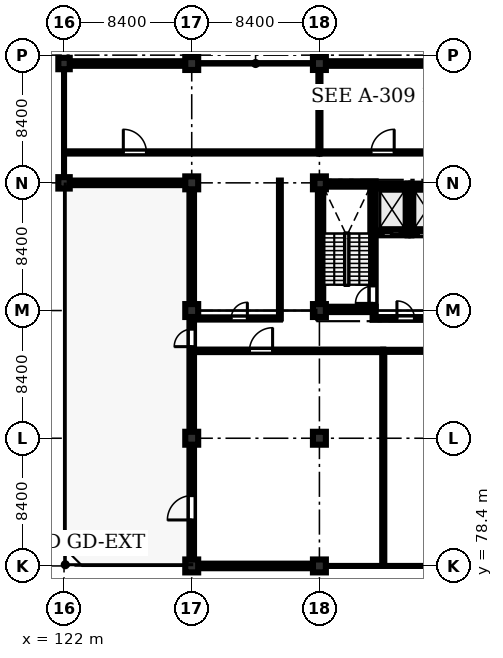
"""IFC4 building model, lengths in metres.
Left out: names, types, materials, properties, quantities, classifications, styles, units other than length and angle.
Written with IfcOpenShell. Run it as: python <this file> out.ifc"""

import sys

from ifc_helpers import new_model, si_unit, direction, frame, frame_2d, origin, origin_2d, place, context, subcontext, project, spatial, rectangle, extrude, element, fill, save


model = new_model("IFC4")
c1 = context("Model", 3, precision=1e-05, world=origin(), true_north=direction((0.0, 1.0)))
c2 = subcontext(c1, "Body", "Model", "MODEL_VIEW")
j1 = project(units=[si_unit("LENGTHUNIT", "METRE"), si_unit("PLANEANGLEUNIT", "RADIAN")], contexts=[c1])
p1 = place(None, origin())
s1 = spatial("IfcSite", under=j1, at=p1, CompositionType="ELEMENT")
p2 = place(p1, origin())
s2 = spatial("IfcBuilding", under=s1, at=p2, CompositionType="ELEMENT")
p3 = place(p2, frame((0.0, 0.0, 27.6)))
s3 = spatial("IfcBuildingStorey", under=s2, at=p3, CompositionType="ELEMENT", Elevation=27.6)
for number, where, z_axis, x_axis in (
    (1, (122.0, 103.6, 0.0), (0.0, 0.0, 1.0), (1.0, 0.0, 0.0)),
    (2, (122.0, 111.45, 0.0), (0.0, 0.0, 1.0), (1.0, 0.0, 0.0)),
):
    element("IfcColumn", number, at=place(p3, frame(where, z_axis=z_axis, x_axis=x_axis)), inside=s3, PredefinedType="COLUMN", context=c2, shape_type="SweptSolid", body=[
        extrude(rectangle(XDim=0.75, YDim=0.75, at=origin_2d()), origin(), (0.0, 0.0, 1.0), 4.02),
    ])
for number, where, z_axis, x_axis in (
    (3, (130.4, 78.4, 0.0), (0.0, 0.0, 1.0), (1.0, 0.0, 0.0)),
    (4, (130.4, 86.8, 0.0), (0.0, 0.0, 1.0), (1.0, 0.0, 0.0)),
    (5, (130.4, 95.2, 0.0), (0.0, 0.0, 1.0), (1.0, 0.0, 0.0)),
    (6, (130.4, 103.6, 0.0), (0.0, 0.0, 1.0), (1.0, 0.0, 0.0)),
    (7, (130.4, 111.45, 0.0), (0.0, 0.0, 1.0), (1.0, 0.0, 0.0)),
    (8, (138.8, 78.4, 0.0), (0.0, 0.0, 1.0), (1.0, 0.0, 0.0)),
    (9, (138.8, 86.8, 0.0), (0.0, 0.0, 1.0), (1.0, 0.0, 0.0)),
    (10, (138.8, 95.2, 0.0), (0.0, 0.0, 1.0), (1.0, 0.0, 0.0)),
    (11, (138.8, 103.6, 0.0), (0.0, 0.0, 1.0), (1.0, 0.0, 0.0)),
    (12, (138.8, 111.45, 0.0), (0.0, 0.0, 1.0), (1.0, 0.0, 0.0)),
):
    element("IfcColumn", number, at=place(p3, frame(where, z_axis=z_axis, x_axis=x_axis)), inside=s3, PredefinedType="COLUMN", context=c2, shape_type="SweptSolid", body=[
        extrude(rectangle(XDim=0.85, YDim=0.85, at=origin_2d()), origin(), (0.0, 0.0, 1.0), 4.02),
    ])
for number, where, z_axis, x_axis in (
    (13, (138.7, 95.275, 0.0), (0.0, 0.0, 1.0), (1.0, 0.0, 0.0)),
    (14, (138.7, 103.525, 0.0), (0.0, 0.0, 1.0), (1.0, 0.0, 0.0)),
):
    element("IfcWall", number, at=place(p3, frame(where, z_axis=z_axis, x_axis=x_axis)), inside=s3, PredefinedType="SHEAR", context=c2, shape_type="SweptSolid", body=[
        extrude(rectangle(XDim=3.8, YDim=0.35, at=frame_2d((1.9, 0.0))), origin(), (0.0, 0.0, 1.0), 4.02),
    ])
p4 = place(p3, frame((138.875, 95.45, 0.0), z_axis=(0.0, 0.0, 1.0), x_axis=(0.0, 1.0, 0.0)))
e15 = element("IfcWall", 15, at=p4, inside=s3, PredefinedType="SHEAR", context=c2, shape_type="SweptSolid", body=[
    extrude(rectangle(XDim=7.9, YDim=0.35, at=frame_2d((3.95, 0.0))), origin(), (0.0, 0.0, 1.0), 4.02),
])
p5 = place(p3, frame((142.325, 95.45, 0.0), z_axis=(0.0, 0.0, 1.0), x_axis=(0.0, 1.0, 0.0)))
e16 = element("IfcWall", 16, at=p5, inside=s3, PredefinedType="SHEAR", context=c2, shape_type="SweptSolid", body=[
    extrude(rectangle(XDim=7.9, YDim=0.35, at=frame_2d((3.95, 0.0))), origin(), (0.0, 0.0, 1.0), 4.02),
])
p6 = place(p5, frame((0.22, 0.0, 0.0)))
e17 = element("IfcOpeningElement", 17, at=p6, cuts=e16, PredefinedType="OPENING", context=c2, shape_type="SweptSolid", body=[
    extrude(rectangle(XDim=1.15, YDim=2.15, at=frame_2d((0.575, 1.075))), frame((0.0, 0.185, 0.0), z_axis=(0.0, -1.0, 0.0), x_axis=(1.0, 0.0, 0.0)), (0.0, 0.0, 1.0), 0.37),
])
p7 = place(p3, frame((142.5, 100.275, 0.0), z_axis=(0.0, 0.0, 1.0), x_axis=(1.0, 0.0, 0.0)))
e18 = element("IfcWall", 18, at=p7, inside=s3, PredefinedType="SHEAR", context=c2, shape_type="SweptSolid", body=[
    extrude(rectangle(XDim=2.1, YDim=0.25, at=frame_2d((1.05, 0.0))), origin(), (0.0, 0.0, 1.0), 4.02),
])
p8 = place(p7, frame((0.5, 0.0, 0.0)))
e19 = element("IfcOpeningElement", 19, at=p8, cuts=e18, PredefinedType="OPENING", context=c2, shape_type="SweptSolid", body=[
    extrude(rectangle(XDim=1.1, YDim=2.15, at=frame_2d((0.55, 1.075))), frame((0.0, 0.135, 0.0), z_axis=(0.0, -1.0, 0.0), x_axis=(1.0, 0.0, 0.0)), (0.0, 0.0, 1.0), 0.27),
])
p9 = place(p3, frame((142.5, 103.425, 0.0), z_axis=(0.0, 0.0, 1.0), x_axis=(1.0, 0.0, 0.0)))
e20 = element("IfcWall", 20, at=p9, inside=s3, PredefinedType="SHEAR", context=c2, shape_type="SweptSolid", body=[
    extrude(rectangle(XDim=2.1, YDim=0.25, at=frame_2d((1.05, 0.0))), origin(), (0.0, 0.0, 1.0), 4.02),
])
p10 = place(p3, frame((144.725, 100.15, 0.0), z_axis=(0.0, 0.0, 1.0), x_axis=(0.0, 1.0, 0.0)))
e21 = element("IfcWall", 21, at=p10, inside=s3, PredefinedType="SHEAR", context=c2, shape_type="SweptSolid", body=[
    extrude(rectangle(XDim=3.4, YDim=0.25, at=frame_2d((1.7, 0.0))), origin(), (0.0, 0.0, 1.0), 4.02),
])
p11 = place(p3, frame((144.85, 100.275, 0.0), z_axis=(0.0, 0.0, 1.0), x_axis=(1.0, 0.0, 0.0)))
e22 = element("IfcWall", 22, at=p11, inside=s3, PredefinedType="SHEAR", context=c2, shape_type="SweptSolid", body=[
    extrude(rectangle(XDim=2.05, YDim=0.25, at=frame_2d((1.025, 0.0))), origin(), (0.0, 0.0, 1.0), 4.02),
])
p12 = place(p11, frame((0.465, 0.0, 0.0)))
e23 = element("IfcOpeningElement", 23, at=p12, cuts=e22, PredefinedType="OPENING", context=c2, shape_type="SweptSolid", body=[
    extrude(rectangle(XDim=1.12, YDim=2.15, at=frame_2d((0.56, 1.075))), frame((0.0, 0.135, 0.0), z_axis=(0.0, -1.0, 0.0), x_axis=(1.0, 0.0, 0.0)), (0.0, 0.0, 1.0), 0.27),
])
p13 = place(p3, frame((144.85, 103.425, 0.0), z_axis=(0.0, 0.0, 1.0), x_axis=(1.0, 0.0, 0.0)))
e24 = element("IfcWall", 24, at=p13, inside=s3, PredefinedType="SHEAR", context=c2, shape_type="SweptSolid", body=[
    extrude(rectangle(XDim=2.05, YDim=0.25, at=frame_2d((1.025, 0.0))), origin(), (0.0, 0.0, 1.0), 4.02),
])
p14 = place(p3, frame((122.375, 111.45, 0.0), z_axis=(0.0, 0.0, 1.0), x_axis=(1.0, 0.0, 0.0)))
e25 = element("IfcWall", 25, at=p14, inside=s3, PredefinedType="STANDARD", context=c2, shape_type="SweptSolid", body=[
    extrude(rectangle(XDim=7.6, YDim=0.3, at=frame_2d((3.8, 0.0))), origin(), (0.0, 0.0, 1.0), 3.32),
])
p15 = place(p14, frame((0.85, 0.0, 0.9)))
e26 = element("IfcOpeningElement", 26, at=p15, cuts=e25, PredefinedType="OPENING", context=c2, shape_type="SweptSolid", body=[
    extrude(rectangle(XDim=1.8, YDim=2.1, at=frame_2d((0.9, 1.05))), frame((0.0, 0.16, 0.0), z_axis=(0.0, -1.0, 0.0), x_axis=(1.0, 0.0, 0.0)), (0.0, 0.0, 1.0), 0.32),
])
p16 = place(p14, frame((4.65, 0.0, 0.9)))
e27 = element("IfcOpeningElement", 27, at=p16, cuts=e25, PredefinedType="OPENING", context=c2, shape_type="SweptSolid", body=[
    extrude(rectangle(XDim=1.8, YDim=2.1, at=frame_2d((0.9, 1.05))), frame((0.0, 0.16, 0.0), z_axis=(0.0, -1.0, 0.0), x_axis=(1.0, 0.0, 0.0)), (0.0, 0.0, 1.0), 0.32),
])
p17 = place(p3, frame((139.225, 111.45, 0.0), z_axis=(0.0, 0.0, 1.0), x_axis=(1.0, 0.0, 0.0)))
e28 = element("IfcWall", 28, at=p17, inside=s3, PredefinedType="STANDARD", context=c2, shape_type="SweptSolid", body=[
    extrude(rectangle(XDim=7.55, YDim=0.3, at=frame_2d((3.775, 0.0))), origin(), (0.0, 0.0, 1.0), 3.32),
])
p18 = place(p17, frame((0.85, 0.0, 0.9)))
e29 = element("IfcOpeningElement", 29, at=p18, cuts=e28, PredefinedType="OPENING", context=c2, shape_type="SweptSolid", body=[
    extrude(rectangle(XDim=1.8, YDim=2.1, at=frame_2d((0.9, 1.05))), frame((0.0, 0.16, 0.0), z_axis=(0.0, -1.0, 0.0), x_axis=(1.0, 0.0, 0.0)), (0.0, 0.0, 1.0), 0.32),
])
p19 = place(p17, frame((4.65, 0.0, 0.9)))
e30 = element("IfcOpeningElement", 30, at=p19, cuts=e28, PredefinedType="OPENING", context=c2, shape_type="SweptSolid", body=[
    extrude(rectangle(XDim=1.8, YDim=2.1, at=frame_2d((0.9, 1.05))), frame((0.0, 0.16, 0.0), z_axis=(0.0, -1.0, 0.0), x_axis=(1.0, 0.0, 0.0)), (0.0, 0.0, 1.0), 0.32),
])
p20 = place(p3, frame((138.375, 78.4, 0.0), z_axis=(0.0, 0.0, 1.0), x_axis=(-1.0, 0.0, 0.0)))
e31 = element("IfcWall", 31, at=p20, inside=s3, PredefinedType="STANDARD", context=c2, shape_type="SweptSolid", body=[
    extrude(rectangle(XDim=7.55, YDim=0.3, at=frame_2d((3.775, 0.0))), origin(), (0.0, 0.0, 1.0), 3.32),
])
p21 = place(p20, frame((1.15, 0.0, 0.95)))
e32 = element("IfcOpeningElement", 32, at=p21, cuts=e31, PredefinedType="OPENING", context=c2, shape_type="SweptSolid", body=[
    extrude(rectangle(XDim=1.85, YDim=2.05, at=frame_2d((0.925, 1.025))), frame((0.0, 0.16, 0.0), z_axis=(0.0, -1.0, 0.0), x_axis=(1.0, 0.0, 0.0)), (0.0, 0.0, 1.0), 0.32),
])
p22 = place(p3, frame((130.4, 78.825, 0.0), z_axis=(0.0, 0.0, 1.0), x_axis=(0.0, 1.0, 0.0)))
e33 = element("IfcWall", 33, at=p22, inside=s3, PredefinedType="STANDARD", context=c2, shape_type="SweptSolid", body=[
    extrude(rectangle(XDim=7.55, YDim=0.3, at=frame_2d((3.775, 0.0))), origin(), (0.0, 0.0, 1.0), 3.32),
])
p23 = place(p22, frame((2.6, 0.0, 0.0)))
e34 = element("IfcOpeningElement", 34, at=p23, cuts=e33, PredefinedType="OPENING", context=c2, shape_type="SweptSolid", body=[
    extrude(rectangle(XDim=1.6, YDim=2.25, at=frame_2d((0.8, 1.125))), frame((0.0, 0.16, 0.0), z_axis=(0.0, -1.0, 0.0), x_axis=(1.0, 0.0, 0.0)), (0.0, 0.0, 1.0), 0.32),
])
p24 = place(p3, frame((130.4, 87.225, 0.0), z_axis=(0.0, 0.0, 1.0), x_axis=(0.0, 1.0, 0.0)))
e35 = element("IfcWall", 35, at=p24, inside=s3, PredefinedType="STANDARD", context=c2, shape_type="SweptSolid", body=[
    extrude(rectangle(XDim=7.55, YDim=0.3, at=frame_2d((3.775, 0.0))), origin(), (0.0, 0.0, 1.0), 3.32),
])
p25 = place(p24, frame((5.6, 0.0, 0.0)))
e36 = element("IfcOpeningElement", 36, at=p25, cuts=e35, PredefinedType="OPENING", context=c2, shape_type="SweptSolid", body=[
    extrude(rectangle(XDim=1.15, YDim=2.25, at=frame_2d((0.575, 1.125))), frame((0.0, 0.16, 0.0), z_axis=(0.0, -1.0, 0.0), x_axis=(1.0, 0.0, 0.0)), (0.0, 0.0, 1.0), 0.32),
])
p26 = place(p3, frame((130.4, 95.625, 0.0), z_axis=(0.0, 0.0, 1.0), x_axis=(0.0, 1.0, 0.0)))
e37 = element("IfcWall", 37, at=p26, inside=s3, PredefinedType="STANDARD", context=c2, shape_type="SweptSolid", body=[
    extrude(rectangle(XDim=7.55, YDim=0.3, at=frame_2d((3.775, 0.0))), origin(), (0.0, 0.0, 1.0), 3.32),
])
p27 = place(p26, frame((2.4, 0.0, 1.0)))
e38 = element("IfcOpeningElement", 38, at=p27, cuts=e37, PredefinedType="OPENING", context=c2, shape_type="SweptSolid", body=[
    extrude(rectangle(XDim=1.8, YDim=1.8, at=frame_2d((0.9, 0.9))), frame((0.0, 0.16, 0.0), z_axis=(0.0, -1.0, 0.0), x_axis=(1.0, 0.0, 0.0)), (0.0, 0.0, 1.0), 0.32),
])
p28 = place(p3, frame((129.975, 103.6, 0.0), z_axis=(0.0, 0.0, 1.0), x_axis=(-1.0, 0.0, 0.0)))
e39 = element("IfcWall", 39, at=p28, inside=s3, PredefinedType="STANDARD", context=c2, shape_type="SweptSolid", body=[
    extrude(rectangle(XDim=7.6, YDim=0.3, at=frame_2d((3.8, 0.0))), origin(), (0.0, 0.0, 1.0), 3.32),
])
p29 = place(p3, frame((142.3, 94.68, 0.0), z_axis=(0.0, 0.0, 1.0), x_axis=(1.0, 0.0, 0.0)))
e40 = element("IfcWall", 40, at=p29, inside=s3, PredefinedType="STANDARD", context=c2, shape_type="SweptSolid", body=[
    extrude(rectangle(XDim=4.8, YDim=0.18, at=frame_2d((2.4, 0.0))), origin(), (0.0, 0.0, 1.0), 4.02),
])
p30 = place(p29, frame((1.6, 0.0, 0.0)))
e41 = element("IfcOpeningElement", 41, at=p30, cuts=e40, PredefinedType="OPENING", context=c2, shape_type="SweptSolid", body=[
    extrude(rectangle(XDim=1.15, YDim=2.15, at=frame_2d((0.575, 1.075))), frame((0.0, 0.1, 0.0), z_axis=(0.0, -1.0, 0.0), x_axis=(1.0, 0.0, 0.0)), (0.0, 0.0, 1.0), 0.2),
])
p31 = place(p3, frame((136.2, 94.68, 0.0), z_axis=(0.0, 0.0, 1.0), x_axis=(0.0, 1.0, 0.0)))
e42 = element("IfcWall", 42, at=p31, inside=s3, PredefinedType="PARTITIONING", context=c2, shape_type="SweptSolid", body=[
    extrude(rectangle(XDim=9.07, YDim=0.12, at=frame_2d((4.535, 0.0))), origin(), (0.0, 0.0, 1.0), 4.02),
])
p32 = place(p3, frame((130.8, 94.68, 0.0), z_axis=(0.0, 0.0, 1.0), x_axis=(1.0, 0.0, 0.0)))
e43 = element("IfcWall", 43, at=p32, inside=s3, PredefinedType="PARTITIONING", context=c2, shape_type="SweptSolid", body=[
    extrude(rectangle(XDim=5.4, YDim=0.145, at=frame_2d((2.7, 0.0))), origin(), (0.0, 0.0, 1.0), 4.02),
])
p33 = place(p32, frame((2.2, 0.0, 0.0)))
e44 = element("IfcOpeningElement", 44, at=p33, cuts=e43, PredefinedType="OPENING", context=c2, shape_type="SweptSolid", body=[
    extrude(rectangle(XDim=1.06, YDim=2.16, at=frame_2d((0.53, 1.08))), frame((0.0, 0.083, 0.0), z_axis=(0.0, -1.0, 0.0), x_axis=(1.0, 0.0, 0.0)), (0.0, 0.0, 1.0), 0.165),
])
p34 = place(p3, frame((122.15, 105.6, 0.0), z_axis=(0.0, 0.0, 1.0), x_axis=(1.0, 0.0, 0.0)))
e45 = element("IfcWall", 45, at=p34, inside=s3, PredefinedType="PARTITIONING", context=c2, shape_type="SweptSolid", body=[
    extrude(rectangle(XDim=16.65, YDim=0.145, at=frame_2d((8.325, 0.0))), origin(), (0.0, 0.0, 1.0), 4.02),
])
p35 = place(p34, frame((3.75, 0.0, 0.0)))
e46 = element("IfcOpeningElement", 46, at=p35, cuts=e45, PredefinedType="OPENING", context=c2, shape_type="SweptSolid", body=[
    extrude(rectangle(XDim=1.52, YDim=2.22, at=frame_2d((0.76, 1.11))), frame((0.0, 0.083, 0.0), z_axis=(0.0, -1.0, 0.0), x_axis=(1.0, 0.0, 0.0)), (0.0, 0.0, 1.0), 0.165),
])
p36 = place(p3, frame((138.8, 105.6, 0.0), z_axis=(0.0, 0.0, 1.0), x_axis=(1.0, 0.0, 0.0)))
e47 = element("IfcWall", 47, at=p36, inside=s3, PredefinedType="PARTITIONING", context=c2, shape_type="SweptSolid", body=[
    extrude(rectangle(XDim=16.8, YDim=0.145, at=frame_2d((8.4, 0.0))), origin(), (0.0, 0.0, 1.0), 4.02),
])
p37 = place(p36, frame((3.4, 0.0, 0.0)))
e48 = element("IfcOpeningElement", 48, at=p37, cuts=e47, PredefinedType="OPENING", context=c2, shape_type="SweptSolid", body=[
    extrude(rectangle(XDim=1.52, YDim=2.22, at=frame_2d((0.76, 1.11))), frame((0.0, 0.083, 0.0), z_axis=(0.0, -1.0, 0.0), x_axis=(1.0, 0.0, 0.0)), (0.0, 0.0, 1.0), 0.165),
])
p38 = place(p3, frame((138.8, 105.6, 0.0), z_axis=(0.0, 0.0, 1.0), x_axis=(0.0, 1.0, 0.0)))
e49 = element("IfcWall", 49, at=p38, inside=s3, PredefinedType="PARTITIONING", context=c2, shape_type="SweptSolid", body=[
    extrude(rectangle(XDim=5.75, YDim=0.135, at=frame_2d((2.875, 0.0))), origin(), (0.0, 0.0, 1.0), 3.32),
])
p39 = place(p3, frame((130.55, 92.55, 0.0), z_axis=(0.0, 0.0, 1.0), x_axis=(1.0, 0.0, 0.0)))
e50 = element("IfcWall", 50, at=p39, inside=s3, PredefinedType="PARTITIONING", context=c2, shape_type="SweptSolid", body=[
    extrude(rectangle(XDim=12.45, YDim=0.165, at=frame_2d((6.225, 0.0))), origin(), (0.0, 0.0, 1.0), 4.02),
])
p40 = place(p39, frame((3.65, 0.0, 0.0)))
e51 = element("IfcOpeningElement", 51, at=p40, cuts=e50, PredefinedType="OPENING", context=c2, shape_type="SweptSolid", body=[
    extrude(rectangle(XDim=1.52, YDim=2.22, at=frame_2d((0.76, 1.11))), frame((0.0, 0.093, 0.0), z_axis=(0.0, -1.0, 0.0), x_axis=(1.0, 0.0, 0.0)), (0.0, 0.0, 1.0), 0.185),
])
p41 = place(p3, frame((143.0, 92.55, 0.0), z_axis=(0.0, 0.0, 1.0), x_axis=(1.0, 0.0, 0.0)))
e52 = element("IfcWall", 52, at=p41, inside=s3, PredefinedType="PARTITIONING", context=c2, shape_type="SweptSolid", body=[
    extrude(rectangle(XDim=12.6, YDim=0.135, at=frame_2d((6.3, 0.0))), origin(), (0.0, 0.0, 1.0), 4.02),
])
p42 = place(p41, frame((6.8, 0.0, 0.0)))
e53 = element("IfcOpeningElement", 53, at=p42, cuts=e52, PredefinedType="OPENING", context=c2, shape_type="SweptSolid", body=[
    extrude(rectangle(XDim=1.08, YDim=2.15, at=frame_2d((0.54, 1.075))), frame((0.0, 0.077, 0.0), z_axis=(0.0, -1.0, 0.0), x_axis=(1.0, 0.0, 0.0)), (0.0, 0.0, 1.0), 0.155),
])
p43 = place(p3, frame((143.0, 78.55, 0.0), z_axis=(0.0, 0.0, 1.0), x_axis=(0.0, 1.0, 0.0)))
e54 = element("IfcWall", 54, at=p43, inside=s3, PredefinedType="PARTITIONING", context=c2, shape_type="SweptSolid", body=[
    extrude(rectangle(XDim=14.0, YDim=0.135, at=frame_2d((7.0, 0.0))), origin(), (0.0, 0.0, 1.0), 3.52),
])
p44 = place(p15, origin())
e55 = element("IfcWindow", 55, at=p44, inside=s3, PartitioningType="DOUBLE_PANEL_VERTICAL", PredefinedType="WINDOW", context=c2, shape_type="SweptSolid", body=[
    extrude(rectangle(XDim=1.8, YDim=2.1, at=frame_2d((0.9, 1.05))), frame((0.0, 0.03, 0.0), z_axis=(0.0, -1.0, 0.0), x_axis=(1.0, 0.0, 0.0)), (0.0, 0.0, 1.0), 0.06),
])
fill(e26, e55)
p45 = place(p16, origin())
e56 = element("IfcWindow", 56, at=p45, inside=s3, PartitioningType="DOUBLE_PANEL_VERTICAL", PredefinedType="WINDOW", context=c2, shape_type="SweptSolid", body=[
    extrude(rectangle(XDim=1.8, YDim=2.1, at=frame_2d((0.9, 1.05))), frame((0.0, 0.03, 0.0), z_axis=(0.0, -1.0, 0.0), x_axis=(1.0, 0.0, 0.0)), (0.0, 0.0, 1.0), 0.06),
])
fill(e27, e56)
p46 = place(p18, origin())
e57 = element("IfcWindow", 57, at=p46, inside=s3, PartitioningType="DOUBLE_PANEL_VERTICAL", PredefinedType="WINDOW", context=c2, shape_type="SweptSolid", body=[
    extrude(rectangle(XDim=1.8, YDim=2.1, at=frame_2d((0.9, 1.05))), frame((0.0, 0.03, 0.0), z_axis=(0.0, -1.0, 0.0), x_axis=(1.0, 0.0, 0.0)), (0.0, 0.0, 1.0), 0.06),
])
fill(e29, e57)
p47 = place(p19, origin())
e58 = element("IfcWindow", 58, at=p47, inside=s3, PartitioningType="DOUBLE_PANEL_VERTICAL", PredefinedType="WINDOW", context=c2, shape_type="SweptSolid", body=[
    extrude(rectangle(XDim=1.8, YDim=2.1, at=frame_2d((0.9, 1.05))), frame((0.0, 0.03, 0.0), z_axis=(0.0, -1.0, 0.0), x_axis=(1.0, 0.0, 0.0)), (0.0, 0.0, 1.0), 0.06),
])
fill(e30, e58)
p48 = place(p21, origin())
e59 = element("IfcWindow", 59, at=p48, inside=s3, PartitioningType="DOUBLE_PANEL_VERTICAL", PredefinedType="WINDOW", context=c2, shape_type="SweptSolid", body=[
    extrude(rectangle(XDim=1.85, YDim=2.05, at=frame_2d((0.925, 1.025))), frame((0.0, 0.03, 0.0), z_axis=(0.0, -1.0, 0.0), x_axis=(1.0, 0.0, 0.0)), (0.0, 0.0, 1.0), 0.06),
])
fill(e32, e59)
p49 = place(p23, origin())
e60 = element("IfcDoor", 60, at=p49, inside=s3, OperationType="SINGLE_SWING_LEFT", PredefinedType="DOOR", context=c2, shape_type="SweptSolid", body=[
    extrude(rectangle(XDim=1.6, YDim=2.25, at=frame_2d((0.8, 1.125))), frame((0.0, 0.025, 0.0), z_axis=(0.0, -1.0, 0.0), x_axis=(1.0, 0.0, 0.0)), (0.0, 0.0, 1.0), 0.05),
])
fill(e34, e60)
p50 = place(p25, origin())
e61 = element("IfcDoor", 61, at=p50, inside=s3, OperationType="SINGLE_SWING_LEFT", PredefinedType="DOOR", context=c2, shape_type="SweptSolid", body=[
    extrude(rectangle(XDim=1.15, YDim=2.25, at=frame_2d((0.575, 1.125))), frame((0.0, 0.025, 0.0), z_axis=(0.0, -1.0, 0.0), x_axis=(1.0, 0.0, 0.0)), (0.0, 0.0, 1.0), 0.05),
])
fill(e36, e61)
p51 = place(p27, origin())
e62 = element("IfcWindow", 62, at=p51, inside=s3, PartitioningType="DOUBLE_PANEL_VERTICAL", PredefinedType="WINDOW", context=c2, shape_type="SweptSolid", body=[
    extrude(rectangle(XDim=1.8, YDim=1.8, at=frame_2d((0.9, 0.9))), frame((0.0, 0.03, 0.0), z_axis=(0.0, -1.0, 0.0), x_axis=(1.0, 0.0, 0.0)), (0.0, 0.0, 1.0), 0.06),
])
fill(e38, e62)
p52 = place(p30, origin())
e63 = element("IfcDoor", 63, at=p52, inside=s3, OperationType="SINGLE_SWING_LEFT", PredefinedType="DOOR", context=c2, shape_type="SweptSolid", body=[
    extrude(rectangle(XDim=1.15, YDim=2.15, at=frame_2d((0.575, 1.075))), frame((0.0, 0.025, 0.0), z_axis=(0.0, -1.0, 0.0), x_axis=(1.0, 0.0, 0.0)), (0.0, 0.0, 1.0), 0.05),
])
fill(e41, e63)
p53 = place(p33, origin())
e64 = element("IfcDoor", 64, at=p53, inside=s3, OperationType="SINGLE_SWING_RIGHT", PredefinedType="DOOR", context=c2, shape_type="SweptSolid", body=[
    extrude(rectangle(XDim=1.06, YDim=2.16, at=frame_2d((0.53, 1.08))), frame((0.0, 0.025, 0.0), z_axis=(0.0, -1.0, 0.0), x_axis=(1.0, 0.0, 0.0)), (0.0, 0.0, 1.0), 0.05),
])
fill(e44, e64)
p54 = place(p35, origin())
e65 = element("IfcDoor", 65, at=p54, inside=s3, OperationType="SINGLE_SWING_LEFT", PredefinedType="DOOR", context=c2, shape_type="SweptSolid", body=[
    extrude(rectangle(XDim=1.52, YDim=2.22, at=frame_2d((0.76, 1.11))), frame((0.0, 0.025, 0.0), z_axis=(0.0, -1.0, 0.0), x_axis=(1.0, 0.0, 0.0)), (0.0, 0.0, 1.0), 0.05),
])
fill(e46, e65)
p55 = place(p37, origin())
e66 = element("IfcDoor", 66, at=p55, inside=s3, OperationType="SINGLE_SWING_RIGHT", PredefinedType="DOOR", context=c2, shape_type="SweptSolid", body=[
    extrude(rectangle(XDim=1.52, YDim=2.22, at=frame_2d((0.76, 1.11))), frame((0.0, 0.025, 0.0), z_axis=(0.0, -1.0, 0.0), x_axis=(1.0, 0.0, 0.0)), (0.0, 0.0, 1.0), 0.05),
])
fill(e48, e66)
p56 = place(p40, origin())
e67 = element("IfcDoor", 67, at=p56, inside=s3, OperationType="SINGLE_SWING_RIGHT", PredefinedType="DOOR", context=c2, shape_type="SweptSolid", body=[
    extrude(rectangle(XDim=1.52, YDim=2.22, at=frame_2d((0.76, 1.11))), frame((0.0, 0.025, 0.0), z_axis=(0.0, -1.0, 0.0), x_axis=(1.0, 0.0, 0.0)), (0.0, 0.0, 1.0), 0.05),
])
fill(e51, e67)
p57 = place(p6, origin())
e68 = element("IfcDoor", 68, at=p57, inside=s3, OperationType="SINGLE_SWING_LEFT", PredefinedType="DOOR", context=c2, shape_type="SweptSolid", body=[
    extrude(rectangle(XDim=1.15, YDim=2.15, at=frame_2d((0.575, 1.075))), frame((0.0, 0.025, 0.0), z_axis=(0.0, -1.0, 0.0), x_axis=(1.0, 0.0, 0.0)), (0.0, 0.0, 1.0), 0.05),
])
fill(e17, e68)
p58 = place(p8, origin())
e69 = element("IfcDoor", 69, at=p58, inside=s3, OperationType="SLIDING_TO_LEFT", PredefinedType="DOOR", context=c2, shape_type="SweptSolid", body=[
    extrude(rectangle(XDim=1.1, YDim=2.15, at=frame_2d((0.55, 1.075))), frame((0.0, 0.025, 0.0), z_axis=(0.0, -1.0, 0.0), x_axis=(1.0, 0.0, 0.0)), (0.0, 0.0, 1.0), 0.05),
])
fill(e19, e69)
p59 = place(p12, origin())
e70 = element("IfcDoor", 70, at=p59, inside=s3, OperationType="SLIDING_TO_LEFT", PredefinedType="DOOR", context=c2, shape_type="SweptSolid", body=[
    extrude(rectangle(XDim=1.12, YDim=2.15, at=frame_2d((0.56, 1.075))), frame((0.0, 0.025, 0.0), z_axis=(0.0, -1.0, 0.0), x_axis=(1.0, 0.0, 0.0)), (0.0, 0.0, 1.0), 0.05),
])
fill(e23, e70)
save(model, sys.argv[1])
